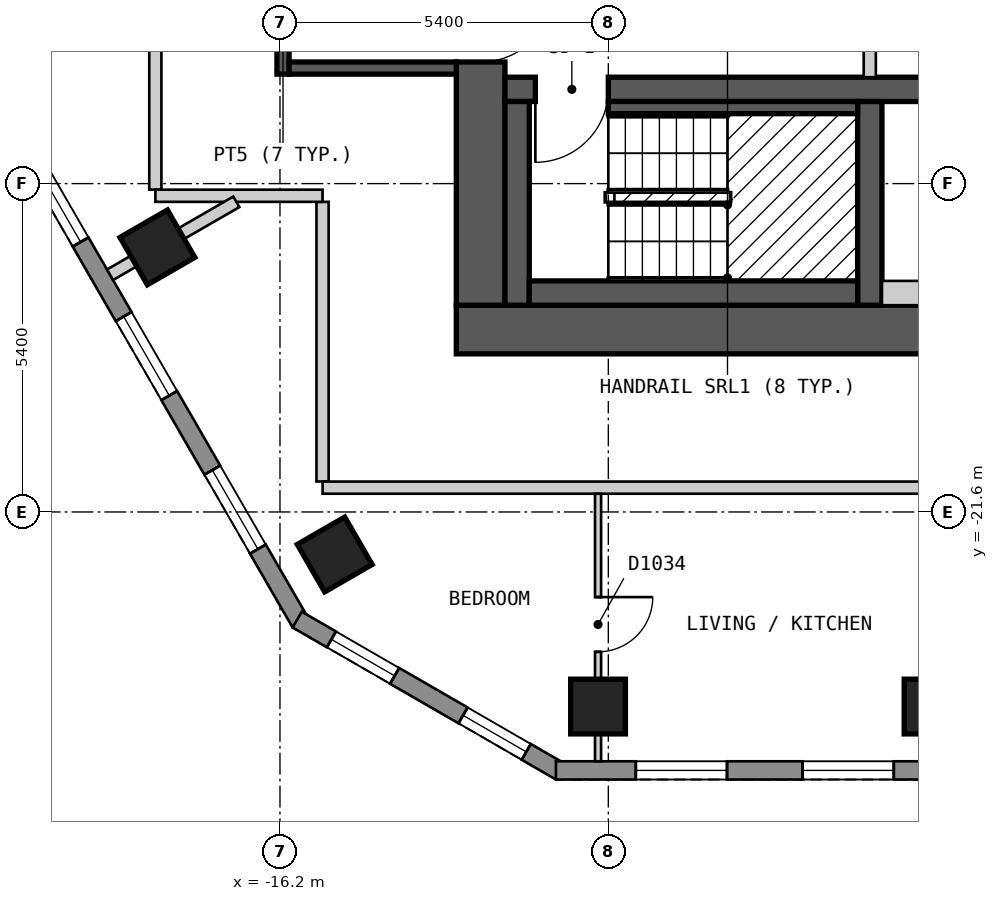
"""IFC4 building model, lengths in metres.
Left out: names, types, materials, properties, quantities, classifications, styles, units other than length and angle.
Written with IfcOpenShell. Run it as: python <this file> out.ifc"""

import sys

from ifc_helpers import new_model, si_unit, direction, frame, frame_2d, origin, origin_2d, place, context, subcontext, project, spatial, polyline, rectangle, outline, extrude, element, fill, save


model = new_model("IFC4")
c1 = context("Model", 3, precision=1e-05, world=origin(), true_north=direction((0.0, 1.0)))
c2 = subcontext(c1, "Body", "Model", "MODEL_VIEW")
j1 = project(units=[si_unit("LENGTHUNIT", "METRE"), si_unit("PLANEANGLEUNIT", "RADIAN")], contexts=[c1])
p1 = place(None, origin())
s1 = spatial("IfcSite", under=j1, at=p1, CompositionType="ELEMENT")
p2 = place(p1, origin())
s2 = spatial("IfcBuilding", under=s1, at=p2, CompositionType="ELEMENT")
p3 = place(p2, frame((0.0, 0.0, 120.6)))
s3 = spatial("IfcBuildingStorey", under=s2, at=p3, CompositionType="ELEMENT", Elevation=120.6)
for number, where, z_axis, x_axis in (
    (1, (-18.216, -17.249, 0.0), (0.0, 0.0, 1.0), (0.5, -0.866, 0.0)),
    (2, (-15.3, -22.299, 0.0), (0.0, 0.0, 1.0), (0.5, -0.866, 0.0)),
    (3, (-10.969, -24.8, 0.0), (0.0, 0.0, 1.0), (1.0, 0.0, 0.0)),
    (4, (-5.484, -24.8, 0.0), (0.0, 0.0, 1.0), (1.0, 0.0, 0.0)),
):
    element("IfcColumn", number, at=place(p3, frame(where, z_axis=z_axis, x_axis=x_axis)), inside=s3, PredefinedType="COLUMN", context=c2, shape_type="SweptSolid", body=[
        extrude(rectangle(XDim=0.9, YDim=0.9, at=origin_2d()), origin(), (0.0, 0.0, 1.0), 3.0),
    ])
p4 = place(p3, frame((-13.3, -18.6, 0.0), z_axis=(0.0, 0.0, 1.0), x_axis=(1.0, 0.0, 0.0)))
e5 = element("IfcWall", 5, at=p4, inside=s3, PredefinedType="SHEAR", context=c2, shape_type="SweptSolid", body=[
    extrude(rectangle(XDim=26.6, YDim=0.8, at=frame_2d((13.3, 0.0))), origin(), (0.0, 0.0, 1.0), 2.7),
])
p5 = place(p3, frame((-12.9, -18.2, 0.0), z_axis=(0.0, 0.0, 1.0), x_axis=(0.0, 1.0, 0.0)))
e6 = element("IfcWall", 6, at=p5, inside=s3, PredefinedType="SHEAR", context=c2, shape_type="SweptSolid", body=[
    extrude(rectangle(XDim=12.4, YDim=0.8, at=frame_2d((6.2, 0.0))), origin(), (0.0, 0.0, 1.0), 2.7),
])
p6 = place(p5, frame((4.0, 0.0, 0.0)))
e7 = element("IfcOpeningElement", 7, at=p6, cuts=e6, PredefinedType="OPENING", context=c2, shape_type="SweptSolid", body=[
    extrude(rectangle(XDim=1.2, YDim=2.1, at=frame_2d((0.6, 1.05))), frame((0.0, 0.41, 0.0), z_axis=(0.0, -1.0, 0.0), x_axis=(1.0, 0.0, 0.0)), (0.0, 0.0, 1.0), 0.82),
])
p7 = place(p3, frame((-12.5, -14.65, 0.0), z_axis=(0.0, 0.0, 1.0), x_axis=(1.0, 0.0, 0.0)))
e8 = element("IfcWall", 8, at=p7, inside=s3, PredefinedType="SHEAR", context=c2, shape_type="SweptSolid", body=[
    extrude(rectangle(XDim=25.0, YDim=0.4, at=frame_2d((12.5, 0.0))), origin(), (0.0, 0.0, 1.0), 2.7),
])
p8 = place(p7, frame((1.7, 0.0, 0.0), z_axis=(0.0, 0.0, 1.0), x_axis=(-1.0, 0.0, 0.0)))
e9 = element("IfcOpeningElement", 9, at=p8, cuts=e8, PredefinedType="OPENING", context=c2, shape_type="SweptSolid", body=[
    extrude(rectangle(XDim=1.2, YDim=2.1, at=frame_2d((0.6, 1.05))), frame((0.0, 0.21, 0.0), z_axis=(0.0, -1.0, 0.0), x_axis=(1.0, 0.0, 0.0)), (0.0, 0.0, 1.0), 0.42),
])
p9 = place(p7, frame((24.55, 0.0, 0.0), z_axis=(0.0, 0.0, 1.0), x_axis=(-1.0, 0.0, 0.0)))
e10 = element("IfcOpeningElement", 10, at=p9, cuts=e8, PredefinedType="OPENING", context=c2, shape_type="SweptSolid", body=[
    extrude(rectangle(XDim=1.2, YDim=2.1, at=frame_2d((0.6, 1.05))), frame((0.0, 0.21, 0.0), z_axis=(0.0, -1.0, 0.0), x_axis=(1.0, 0.0, 0.0)), (0.0, 0.0, 1.0), 0.42),
])
p10 = place(p7, frame((9.65, 0.0, 0.0), z_axis=(0.0, 0.0, 1.0), x_axis=(-1.0, 0.0, 0.0)))
e11 = element("IfcOpeningElement", 11, at=p10, cuts=e8, PredefinedType="OPENING", context=c2, shape_type="SweptSolid", body=[
    extrude(rectangle(XDim=1.0, YDim=2.1, at=frame_2d((0.5, 1.05))), frame((0.0, 0.21, 0.0), z_axis=(0.0, -1.0, 0.0), x_axis=(1.0, 0.0, 0.0)), (0.0, 0.0, 1.0), 0.42),
])
p11 = place(p7, frame((16.05, 0.0, 0.0), z_axis=(0.0, 0.0, 1.0), x_axis=(-1.0, 0.0, 0.0)))
e12 = element("IfcOpeningElement", 12, at=p11, cuts=e8, PredefinedType="OPENING", context=c2, shape_type="SweptSolid", body=[
    extrude(rectangle(XDim=1.0, YDim=2.1, at=frame_2d((0.5, 1.05))), frame((0.0, 0.21, 0.0), z_axis=(0.0, -1.0, 0.0), x_axis=(1.0, 0.0, 0.0)), (0.0, 0.0, 1.0), 0.42),
])
p12 = place(p3, frame((-6.5, -18.2, 0.0), z_axis=(0.0, 0.0, 1.0), x_axis=(0.0, 1.0, 0.0)))
e13 = element("IfcWall", 13, at=p12, inside=s3, PredefinedType="SHEAR", context=c2, shape_type="SweptSolid", body=[
    extrude(rectangle(XDim=3.35, YDim=0.4, at=frame_2d((1.675, 0.0))), origin(), (0.0, 0.0, 1.0), 2.7),
])
p13 = place(p3, frame((-28.218, -2.025, 0.0), z_axis=(0.0, 0.0, 1.0), x_axis=(0.500017503135, -0.866015298109, 0.0)))
e14 = element("IfcWall", 14, at=p13, inside=s3, PredefinedType="SOLIDWALL", context=c2, shape_type="SweptSolid", body=[
    extrude(outline(polyline([(0.0, -0.15), (24.711, -0.15), (24.631, 0.15), (0.08, 0.15), (0.0, -0.15)])), origin(), (0.0, 0.0, 1.0), 2.7),
])
p14 = place(p13, frame((1.4, 0.0, 0.15)))
e15 = element("IfcOpeningElement", 15, at=p14, cuts=e14, PredefinedType="OPENING", context=c2, shape_type="SweptSolid", body=[
    extrude(rectangle(XDim=1.5, YDim=2.1, at=frame_2d((0.75, 1.05))), frame((0.0, 0.16, 0.0), z_axis=(0.0, -1.0, 0.0), x_axis=(1.0, 0.0, 0.0)), (0.0, 0.0, 1.0), 0.32),
])
p15 = place(p13, frame((4.316, 0.0, 0.15)))
e16 = element("IfcOpeningElement", 16, at=p15, cuts=e14, PredefinedType="OPENING", context=c2, shape_type="SweptSolid", body=[
    extrude(rectangle(XDim=1.5, YDim=2.1, at=frame_2d((0.75, 1.05))), frame((0.0, 0.16, 0.0), z_axis=(0.0, -1.0, 0.0), x_axis=(1.0, 0.0, 0.0)), (0.0, 0.0, 1.0), 0.32),
])
p16 = place(p13, frame((7.231, 0.0, 0.15)))
e17 = element("IfcOpeningElement", 17, at=p16, cuts=e14, PredefinedType="OPENING", context=c2, shape_type="SweptSolid", body=[
    extrude(rectangle(XDim=1.5, YDim=2.1, at=frame_2d((0.75, 1.05))), frame((0.0, 0.16, 0.0), z_axis=(0.0, -1.0, 0.0), x_axis=(1.0, 0.0, 0.0)), (0.0, 0.0, 1.0), 0.32),
])
p17 = place(p13, frame((10.147, 0.0, 0.15)))
e18 = element("IfcOpeningElement", 18, at=p17, cuts=e14, PredefinedType="OPENING", context=c2, shape_type="SweptSolid", body=[
    extrude(rectangle(XDim=1.5, YDim=2.1, at=frame_2d((0.75, 1.05))), frame((0.0, 0.16, 0.0), z_axis=(0.0, -1.0, 0.0), x_axis=(1.0, 0.0, 0.0)), (0.0, 0.0, 1.0), 0.32),
])
p18 = place(p13, frame((13.062, 0.0, 0.15)))
e19 = element("IfcOpeningElement", 19, at=p18, cuts=e14, PredefinedType="OPENING", context=c2, shape_type="SweptSolid", body=[
    extrude(rectangle(XDim=1.5, YDim=2.1, at=frame_2d((0.75, 1.05))), frame((0.0, 0.16, 0.0), z_axis=(0.0, -1.0, 0.0), x_axis=(1.0, 0.0, 0.0)), (0.0, 0.0, 1.0), 0.32),
])
p19 = place(p13, frame((15.977, 0.0, 0.15)))
e20 = element("IfcOpeningElement", 20, at=p19, cuts=e14, PredefinedType="OPENING", context=c2, shape_type="SweptSolid", body=[
    extrude(rectangle(XDim=1.5, YDim=2.1, at=frame_2d((0.75, 1.05))), frame((0.0, 0.16, 0.0), z_axis=(0.0, -1.0, 0.0), x_axis=(1.0, 0.0, 0.0)), (0.0, 0.0, 1.0), 0.32),
])
p20 = place(p13, frame((18.893, 0.0, 0.15)))
e21 = element("IfcOpeningElement", 21, at=p20, cuts=e14, PredefinedType="OPENING", context=c2, shape_type="SweptSolid", body=[
    extrude(rectangle(XDim=1.5, YDim=2.1, at=frame_2d((0.75, 1.05))), frame((0.0, 0.16, 0.0), z_axis=(0.0, -1.0, 0.0), x_axis=(1.0, 0.0, 0.0)), (0.0, 0.0, 1.0), 0.32),
])
p21 = place(p13, frame((21.809, 0.0, 0.15)))
e22 = element("IfcOpeningElement", 22, at=p21, cuts=e14, PredefinedType="OPENING", context=c2, shape_type="SweptSolid", body=[
    extrude(rectangle(XDim=1.5, YDim=2.1, at=frame_2d((0.75, 1.05))), frame((0.0, 0.16, 0.0), z_axis=(0.0, -1.0, 0.0), x_axis=(1.0, 0.0, 0.0)), (0.0, 0.0, 1.0), 0.32),
])
p22 = place(p3, frame((-15.917, -23.37, 0.0), z_axis=(0.0, 0.0, 1.0), x_axis=(0.866022959057, -0.500004234368, 0.0)))
e23 = element("IfcWall", 23, at=p22, inside=s3, PredefinedType="SOLIDWALL", context=c2, shape_type="SweptSolid", body=[
    extrude(outline(polyline([(0.0, -0.15), (5.0, -0.15), (4.92, 0.15), (0.08, 0.15), (0.0, -0.15)])), origin(), (0.0, 0.0, 1.0), 2.7),
])
p23 = place(p22, frame((0.65, 0.0, 0.15)))
e24 = element("IfcOpeningElement", 24, at=p23, cuts=e23, PredefinedType="OPENING", context=c2, shape_type="SweptSolid", body=[
    extrude(rectangle(XDim=1.2, YDim=2.1, at=frame_2d((0.6, 1.05))), frame((0.0, 0.16, 0.0), z_axis=(0.0, -1.0, 0.0), x_axis=(1.0, 0.0, 0.0)), (0.0, 0.0, 1.0), 0.32),
])
p24 = place(p22, frame((3.15, 0.0, 0.15)))
e25 = element("IfcOpeningElement", 25, at=p24, cuts=e23, PredefinedType="OPENING", context=c2, shape_type="SweptSolid", body=[
    extrude(rectangle(XDim=1.2, YDim=2.1, at=frame_2d((0.6, 1.05))), frame((0.0, 0.16, 0.0), z_axis=(0.0, -1.0, 0.0), x_axis=(1.0, 0.0, 0.0)), (0.0, 0.0, 1.0), 0.32),
])
p25 = place(p3, frame((-11.662, -25.85, 0.0), z_axis=(0.0, 0.0, 1.0), x_axis=(1.0, 0.0, 0.0)))
e26 = element("IfcWall", 26, at=p25, inside=s3, PredefinedType="SOLIDWALL", context=c2, shape_type="SweptSolid", body=[
    extrude(outline(polyline([(0.0, -0.15), (23.324, -0.15), (23.244, 0.15), (0.08, 0.15), (0.0, -0.15)])), origin(), (0.0, 0.0, 1.0), 2.7),
])
p26 = place(p25, frame((1.314, 0.0, 0.15)))
e27 = element("IfcOpeningElement", 27, at=p26, cuts=e26, PredefinedType="OPENING", context=c2, shape_type="SweptSolid", body=[
    extrude(rectangle(XDim=1.5, YDim=2.1, at=frame_2d((0.75, 1.05))), frame((0.0, 0.16, 0.0), z_axis=(0.0, -1.0, 0.0), x_axis=(1.0, 0.0, 0.0)), (0.0, 0.0, 1.0), 0.32),
])
p27 = place(p25, frame((4.057, 0.0, 0.15)))
e28 = element("IfcOpeningElement", 28, at=p27, cuts=e26, PredefinedType="OPENING", context=c2, shape_type="SweptSolid", body=[
    extrude(rectangle(XDim=1.5, YDim=2.1, at=frame_2d((0.75, 1.05))), frame((0.0, 0.16, 0.0), z_axis=(0.0, -1.0, 0.0), x_axis=(1.0, 0.0, 0.0)), (0.0, 0.0, 1.0), 0.32),
])
p28 = place(p25, frame((6.799, 0.0, 0.15)))
e29 = element("IfcOpeningElement", 29, at=p28, cuts=e26, PredefinedType="OPENING", context=c2, shape_type="SweptSolid", body=[
    extrude(rectangle(XDim=1.5, YDim=2.1, at=frame_2d((0.75, 1.05))), frame((0.0, 0.16, 0.0), z_axis=(0.0, -1.0, 0.0), x_axis=(1.0, 0.0, 0.0)), (0.0, 0.0, 1.0), 0.32),
])
p29 = place(p25, frame((9.542, 0.0, 0.15)))
e30 = element("IfcOpeningElement", 30, at=p29, cuts=e26, PredefinedType="OPENING", context=c2, shape_type="SweptSolid", body=[
    extrude(rectangle(XDim=1.5, YDim=2.1, at=frame_2d((0.75, 1.05))), frame((0.0, 0.16, 0.0), z_axis=(0.0, -1.0, 0.0), x_axis=(1.0, 0.0, 0.0)), (0.0, 0.0, 1.0), 0.32),
])
p30 = place(p25, frame((12.284, 0.0, 0.15)))
e31 = element("IfcOpeningElement", 31, at=p30, cuts=e26, PredefinedType="OPENING", context=c2, shape_type="SweptSolid", body=[
    extrude(rectangle(XDim=1.5, YDim=2.1, at=frame_2d((0.75, 1.05))), frame((0.0, 0.16, 0.0), z_axis=(0.0, -1.0, 0.0), x_axis=(1.0, 0.0, 0.0)), (0.0, 0.0, 1.0), 0.32),
])
p31 = place(p25, frame((15.027, 0.0, 0.15)))
e32 = element("IfcOpeningElement", 32, at=p31, cuts=e26, PredefinedType="OPENING", context=c2, shape_type="SweptSolid", body=[
    extrude(rectangle(XDim=1.5, YDim=2.1, at=frame_2d((0.75, 1.05))), frame((0.0, 0.16, 0.0), z_axis=(0.0, -1.0, 0.0), x_axis=(1.0, 0.0, 0.0)), (0.0, 0.0, 1.0), 0.32),
])
p32 = place(p25, frame((17.769, 0.0, 0.15)))
e33 = element("IfcOpeningElement", 33, at=p32, cuts=e26, PredefinedType="OPENING", context=c2, shape_type="SweptSolid", body=[
    extrude(rectangle(XDim=1.5, YDim=2.1, at=frame_2d((0.75, 1.05))), frame((0.0, 0.16, 0.0), z_axis=(0.0, -1.0, 0.0), x_axis=(1.0, 0.0, 0.0)), (0.0, 0.0, 1.0), 0.32),
])
p33 = place(p25, frame((20.512, 0.0, 0.15)))
e34 = element("IfcOpeningElement", 34, at=p33, cuts=e26, PredefinedType="OPENING", context=c2, shape_type="SweptSolid", body=[
    extrude(rectangle(XDim=1.5, YDim=2.1, at=frame_2d((0.75, 1.05))), frame((0.0, 0.16, 0.0), z_axis=(0.0, -1.0, 0.0), x_axis=(1.0, 0.0, 0.0)), (0.0, 0.0, 1.0), 0.32),
])
p34 = place(p3, frame((-15.5, -16.5, 0.0), z_axis=(0.0, 0.0, 1.0), x_axis=(0.0, -1.0, 0.0)))
e35 = element("IfcWall", 35, at=p34, inside=s3, PredefinedType="PARTITIONING", context=c2, shape_type="SweptSolid", body=[
    extrude(rectangle(XDim=4.599, YDim=0.2, at=frame_2d((2.3, 0.0))), origin(), (0.0, 0.0, 1.0), 2.7),
])
p35 = place(p3, frame((-18.25, -10.593, 0.0), z_axis=(0.0, 0.0, 1.0), x_axis=(0.0, -1.0, 0.0)))
e36 = element("IfcWall", 36, at=p35, inside=s3, PredefinedType="PARTITIONING", context=c2, shape_type="SweptSolid", body=[
    extrude(rectangle(XDim=5.706, YDim=0.2, at=frame_2d((2.853, 0.0))), origin(), (0.0, 0.0, 1.0), 2.7),
])
p36 = place(p3, frame((-18.249, -16.4, 0.0), z_axis=(0.0, 0.0, 1.0), x_axis=(1.0, 0.0, 0.0)))
e37 = element("IfcWall", 37, at=p36, inside=s3, PredefinedType="PARTITIONING", context=c2, shape_type="SweptSolid", body=[
    extrude(rectangle(XDim=2.749, YDim=0.2, at=frame_2d((1.375, 0.0))), origin(), (0.0, 0.0, 1.0), 2.7),
])
p37 = place(p3, frame((-15.499, -21.2, 0.0), z_axis=(0.0, 0.0, 1.0), x_axis=(1.0, 0.0, 0.0)))
e38 = element("IfcWall", 38, at=p37, inside=s3, PredefinedType="PARTITIONING", context=c2, shape_type="SweptSolid", body=[
    extrude(rectangle(XDim=30.899, YDim=0.2, at=frame_2d((15.449, 0.0))), origin(), (0.0, 0.0, 1.0), 2.7),
])
p38 = place(p37, frame((12.258, 0.0, 0.0)))
e39 = element("IfcOpeningElement", 39, at=p38, cuts=e38, PredefinedType="OPENING", context=c2, shape_type="SweptSolid", body=[
    extrude(rectangle(XDim=1.0, YDim=2.1, at=frame_2d((0.5, 1.05))), frame((0.0, 0.11, 0.0), z_axis=(0.0, -1.0, 0.0), x_axis=(1.0, 0.0, 0.0)), (0.0, 0.0, 1.0), 0.22),
])
p39 = place(p3, frame((-10.969, -25.7, 0.0), z_axis=(0.0, 0.0, 1.0), x_axis=(0.0, 1.0, 0.0)))
e40 = element("IfcWall", 40, at=p39, inside=s3, PredefinedType="PARTITIONING", context=c2, shape_type="SweptSolid", body=[
    extrude(rectangle(XDim=4.4, YDim=0.1, at=frame_2d((2.2, 0.0))), origin(), (0.0, 0.0, 1.0), 2.7),
])
p40 = place(p39, frame((1.8, 0.0, 0.0)))
e41 = element("IfcOpeningElement", 41, at=p40, cuts=e40, PredefinedType="OPENING", context=c2, shape_type="SweptSolid", body=[
    extrude(rectangle(XDim=0.9, YDim=2.1, at=frame_2d((0.45, 1.05))), frame((0.0, 0.06, 0.0), z_axis=(0.0, -1.0, 0.0), x_axis=(1.0, 0.0, 0.0)), (0.0, 0.0, 1.0), 0.12),
])
p41 = place(p3, frame((-18.995, -17.699, 0.0), z_axis=(0.0, 0.0, 1.0), x_axis=(0.86607371389, 0.499916315105, 0.0)))
e42 = element("IfcWall", 42, at=p41, inside=s3, PredefinedType="PARTITIONING", context=c2, shape_type="SweptSolid", body=[
    extrude(rectangle(XDim=2.398, YDim=0.2, at=frame_2d((1.199, 0.0))), origin(), (0.0, 0.0, 1.0), 2.7),
])
p42 = place(p3, frame((-16.15, -14.4, 0.0), z_axis=(0.0, 0.0, 1.0), x_axis=(0.0, 1.0, 0.0)))
e43 = element("IfcWall", 43, at=p42, inside=s3, PredefinedType="SOLIDWALL", context=c2, shape_type="SweptSolid", body=[
    extrude(rectangle(XDim=5.8, YDim=0.2, at=frame_2d((2.9, 0.0))), origin(), (0.0, 0.0, 1.0), 2.7),
])
p43 = place(p3, frame((-16.05, -14.3, 0.0), z_axis=(0.0, 0.0, 1.0), x_axis=(1.0, 0.0, 0.0)))
e44 = element("IfcWall", 44, at=p43, inside=s3, PredefinedType="SOLIDWALL", context=c2, shape_type="SweptSolid", body=[
    extrude(rectangle(XDim=2.75, YDim=0.2, at=frame_2d((1.375, 0.0))), origin(), (0.0, 0.0, 1.0), 2.7),
])
p44 = place(p3, frame((-12.3, -18.2, 0.0), z_axis=(0.0, 0.0, 1.0), x_axis=(0.0, 1.0, 0.0)))
e45 = element("IfcWall", 45, at=p44, inside=s3, PredefinedType="SOLIDWALL", context=c2, shape_type="SweptSolid", body=[
    extrude(rectangle(XDim=3.35, YDim=0.4, at=frame_2d((1.675, 0.0))), origin(), (0.0, 0.0, 1.0), 2.7),
])
p45 = place(p3, frame((-12.1, -18.0, 0.0), z_axis=(0.0, 0.0, 1.0), x_axis=(1.0, 0.0, 0.0)))
e46 = element("IfcWall", 46, at=p45, inside=s3, PredefinedType="SOLIDWALL", context=c2, shape_type="SweptSolid", body=[
    extrude(rectangle(XDim=5.4, YDim=0.4, at=frame_2d((2.7, 0.0))), origin(), (0.0, 0.0, 1.0), 2.7),
])
p46 = place(p3, frame((-10.8, -14.95, 0.0), z_axis=(0.0, 0.0, 1.0), x_axis=(1.0, 0.0, 0.0)))
e47 = element("IfcWall", 47, at=p46, inside=s3, PredefinedType="SOLIDWALL", context=c2, shape_type="SweptSolid", body=[
    extrude(rectangle(XDim=4.1, YDim=0.2, at=frame_2d((2.05, 0.0))), origin(), (0.0, 0.0, 1.0), 2.7),
])
p47 = place(p3, frame((-6.5, -14.45, 0.0), z_axis=(0.0, 0.0, 1.0), x_axis=(0.0, 1.0, 0.0)))
e48 = element("IfcWall", 48, at=p47, inside=s3, PredefinedType="PARTITIONING", context=c2, shape_type="SweptSolid", body=[
    extrude(rectangle(XDim=4.9, YDim=0.2, at=frame_2d((2.45, 0.0))), origin(), (0.0, 0.0, 1.0), 2.7),
])
p48 = place(p47, frame((3.15, 0.0, 0.0), z_axis=(0.0, 0.0, 1.0), x_axis=(-1.0, 0.0, 0.0)))
e49 = element("IfcOpeningElement", 49, at=p48, cuts=e48, PredefinedType="OPENING", context=c2, shape_type="SweptSolid", body=[
    extrude(rectangle(XDim=1.4, YDim=2.1, at=frame_2d((0.7, 1.05))), frame((0.0, 0.11, 0.0), z_axis=(0.0, -1.0, 0.0), x_axis=(1.0, 0.0, 0.0)), (0.0, 0.0, 1.0), 0.22),
])
p49 = place(p3, frame((-6.3, -18.0, 0.0), z_axis=(0.0, 0.0, 1.0), x_axis=(1.0, 0.0, 0.0)))
e50 = element("IfcWall", 50, at=p49, inside=s3, PredefinedType="PARTITIONING", context=c2, shape_type="SweptSolid", body=[
    extrude(rectangle(XDim=12.6, YDim=0.4, at=frame_2d((6.3, 0.0))), origin(), (0.0, 0.0, 1.0), 2.7),
])
p50 = place(p19, origin())
e51 = element("IfcWindow", 51, at=p50, inside=s3, PartitioningType="SINGLE_PANEL", PredefinedType="WINDOW", context=c2, shape_type="SweptSolid", body=[
    extrude(rectangle(XDim=1.5, YDim=2.1, at=frame_2d((0.75, 1.05))), frame((0.0, 0.03, 0.0), z_axis=(0.0, -1.0, 0.0), x_axis=(1.0, 0.0, 0.0)), (0.0, 0.0, 1.0), 0.06),
])
fill(e20, e51)
p51 = place(p20, origin())
e52 = element("IfcWindow", 52, at=p51, inside=s3, PartitioningType="SINGLE_PANEL", PredefinedType="WINDOW", context=c2, shape_type="SweptSolid", body=[
    extrude(rectangle(XDim=1.5, YDim=2.1, at=frame_2d((0.75, 1.05))), frame((0.0, 0.03, 0.0), z_axis=(0.0, -1.0, 0.0), x_axis=(1.0, 0.0, 0.0)), (0.0, 0.0, 1.0), 0.06),
])
fill(e21, e52)
p52 = place(p21, origin())
e53 = element("IfcWindow", 53, at=p52, inside=s3, PartitioningType="SINGLE_PANEL", PredefinedType="WINDOW", context=c2, shape_type="SweptSolid", body=[
    extrude(rectangle(XDim=1.5, YDim=2.1, at=frame_2d((0.75, 1.05))), frame((0.0, 0.03, 0.0), z_axis=(0.0, -1.0, 0.0), x_axis=(1.0, 0.0, 0.0)), (0.0, 0.0, 1.0), 0.06),
])
fill(e22, e53)
p53 = place(p23, origin())
e54 = element("IfcWindow", 54, at=p53, inside=s3, PartitioningType="SINGLE_PANEL", PredefinedType="WINDOW", context=c2, shape_type="SweptSolid", body=[
    extrude(rectangle(XDim=1.2, YDim=2.1, at=frame_2d((0.6, 1.05))), frame((0.0, 0.03, 0.0), z_axis=(0.0, -1.0, 0.0), x_axis=(1.0, 0.0, 0.0)), (0.0, 0.0, 1.0), 0.06),
])
fill(e24, e54)
p54 = place(p24, origin())
e55 = element("IfcWindow", 55, at=p54, inside=s3, PartitioningType="SINGLE_PANEL", PredefinedType="WINDOW", context=c2, shape_type="SweptSolid", body=[
    extrude(rectangle(XDim=1.2, YDim=2.1, at=frame_2d((0.6, 1.05))), frame((0.0, 0.03, 0.0), z_axis=(0.0, -1.0, 0.0), x_axis=(1.0, 0.0, 0.0)), (0.0, 0.0, 1.0), 0.06),
])
fill(e25, e55)
p55 = place(p26, origin())
e56 = element("IfcWindow", 56, at=p55, inside=s3, PartitioningType="SINGLE_PANEL", PredefinedType="WINDOW", context=c2, shape_type="SweptSolid", body=[
    extrude(rectangle(XDim=1.5, YDim=2.1, at=frame_2d((0.75, 1.05))), frame((0.0, 0.03, 0.0), z_axis=(0.0, -1.0, 0.0), x_axis=(1.0, 0.0, 0.0)), (0.0, 0.0, 1.0), 0.06),
])
fill(e27, e56)
p56 = place(p27, origin())
e57 = element("IfcWindow", 57, at=p56, inside=s3, PartitioningType="SINGLE_PANEL", PredefinedType="WINDOW", context=c2, shape_type="SweptSolid", body=[
    extrude(rectangle(XDim=1.5, YDim=2.1, at=frame_2d((0.75, 1.05))), frame((0.0, 0.03, 0.0), z_axis=(0.0, -1.0, 0.0), x_axis=(1.0, 0.0, 0.0)), (0.0, 0.0, 1.0), 0.06),
])
fill(e28, e57)
p57 = place(p40, origin())
e58 = element("IfcDoor", 58, at=p57, inside=s3, OperationType="SINGLE_SWING_RIGHT", PredefinedType="DOOR", context=c2, shape_type="SweptSolid", body=[
    extrude(rectangle(XDim=0.9, YDim=2.1, at=frame_2d((0.45, 1.05))), frame((0.0, 0.025, 0.0), z_axis=(0.0, -1.0, 0.0), x_axis=(1.0, 0.0, 0.0)), (0.0, 0.0, 1.0), 0.05),
])
fill(e41, e58)
p58 = place(p8, origin())
e59 = element("IfcDoor", 59, at=p58, inside=s3, OperationType="SINGLE_SWING_RIGHT", PredefinedType="DOOR", context=c2, shape_type="SweptSolid", body=[
    extrude(rectangle(XDim=1.2, YDim=2.1, at=frame_2d((0.6, 1.05))), frame((0.0, 0.025, 0.0), z_axis=(0.0, -1.0, 0.0), x_axis=(1.0, 0.0, 0.0)), (0.0, 0.0, 1.0), 0.05),
])
fill(e9, e59)
p59 = place(p6, origin())
e60 = element("IfcDoor", 60, at=p59, inside=s3, OperationType="SINGLE_SWING_RIGHT", PredefinedType="DOOR", context=c2, shape_type="SweptSolid", body=[
    extrude(rectangle(XDim=1.2, YDim=2.1, at=frame_2d((0.6, 1.05))), frame((0.0, 0.025, 0.0), z_axis=(0.0, -1.0, 0.0), x_axis=(1.0, 0.0, 0.0)), (0.0, 0.0, 1.0), 0.05),
])
fill(e7, e60)
save(model, sys.argv[1])
